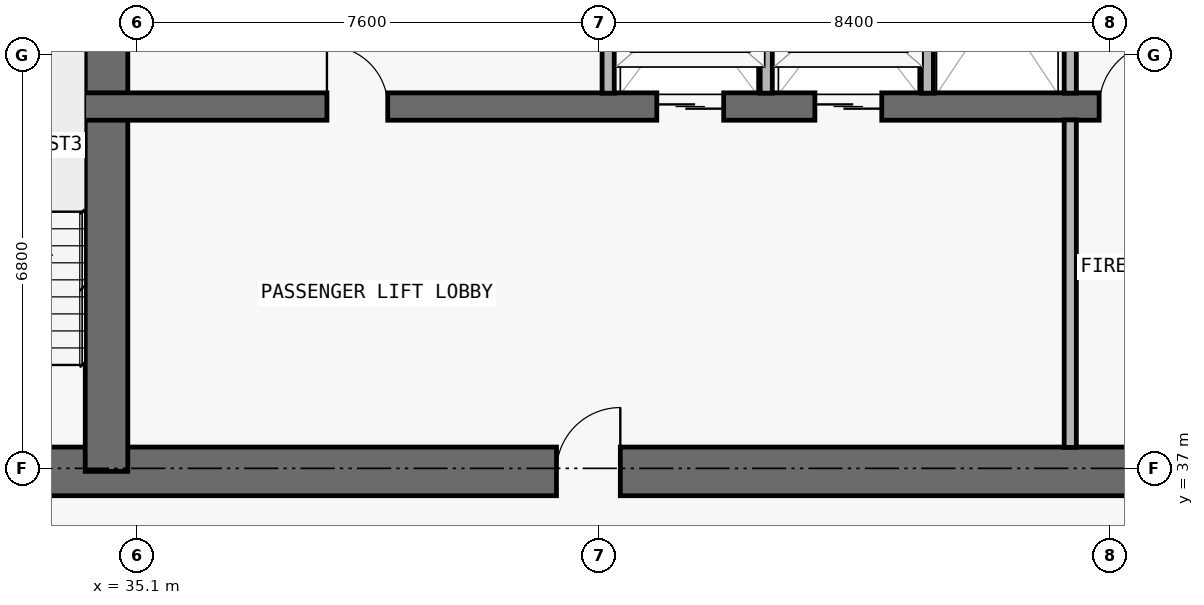
"""IFC4 building model, lengths in metres.
Left out: names, types, materials, properties, quantities, classifications, styles, units other than length and angle.
Written with IfcOpenShell. Run it as: python <this file> out.ifc"""

import sys

from ifc_helpers import new_model, si_unit, direction, frame, frame_2d, origin, place, context, subcontext, project, spatial, rectangle, extrude, element, fill, save


model = new_model("IFC4")
c1 = context("Model", 3, precision=1e-05, world=origin(), true_north=direction((0.0, 1.0)))
c2 = subcontext(c1, "Body", "Model", "MODEL_VIEW")
j1 = project(units=[si_unit("LENGTHUNIT", "METRE"), si_unit("PLANEANGLEUNIT", "RADIAN")], contexts=[c1])
p1 = place(None, origin())
s1 = spatial("IfcSite", under=j1, at=p1, CompositionType="ELEMENT")
p2 = place(p1, origin())
s2 = spatial("IfcBuilding", under=s1, at=p2, CompositionType="ELEMENT")
p3 = place(p2, frame((0.0, 0.0, 102.6)))
s3 = spatial("IfcBuildingStorey", under=s2, at=p3, CompositionType="ELEMENT", Elevation=102.6)
p4 = place(p3, frame((17.85, 36.95, 0.0), z_axis=(0.0, 0.0, 1.0), x_axis=(1.0, 0.0, 0.0)))
e1 = element("IfcWall", 1, at=p4, inside=s3, PredefinedType="SHEAR", context=c2, shape_type="SweptSolid", body=[
    extrude(rectangle(XDim=42.1, YDim=0.8, at=frame_2d((21.05, 0.0))), origin(), (0.0, 0.0, 1.0), 3.05),
])
p5 = place(p4, frame((14.45, 0.0, 0.0)))
e2 = element("IfcOpeningElement", 2, at=p5, cuts=e1, PredefinedType="OPENING", context=c2, shape_type="SweptSolid", body=[
    extrude(rectangle(XDim=1.1, YDim=2.15, at=frame_2d((0.55, 1.075))), frame((0.0, 0.41, 0.0), z_axis=(0.0, -1.0, 0.0), x_axis=(1.0, 0.0, 0.0)), (0.0, 0.0, 1.0), 0.82),
])
p6 = place(p4, frame((6.3, 0.0, 0.0)))
e3 = element("IfcOpeningElement", 3, at=p6, cuts=e1, PredefinedType="OPENING", context=c2, shape_type="SweptSolid", body=[
    extrude(rectangle(XDim=1.05, YDim=2.15, at=frame_2d((0.525, 1.075))), frame((0.0, 0.41, 0.0), z_axis=(0.0, -1.0, 0.0), x_axis=(1.0, 0.0, 0.0)), (0.0, 0.0, 1.0), 0.82),
])
p7 = place(p4, frame((34.8, 0.0, 0.0)))
e4 = element("IfcOpeningElement", 4, at=p7, cuts=e1, PredefinedType="OPENING", context=c2, shape_type="SweptSolid", body=[
    extrude(rectangle(XDim=1.05, YDim=2.15, at=frame_2d((0.525, 1.075))), frame((0.0, 0.41, 0.0), z_axis=(0.0, -1.0, 0.0), x_axis=(1.0, 0.0, 0.0)), (0.0, 0.0, 1.0), 0.82),
])
p8 = place(p4, frame((10.913, 0.0, 0.0)))
e5 = element("IfcOpeningElement", 5, at=p8, cuts=e1, PredefinedType="OPENING", context=c2, shape_type="SweptSolid", body=[
    extrude(rectangle(XDim=1.05, YDim=2.15, at=frame_2d((0.525, 1.075))), frame((0.0, 0.41, 0.0), z_axis=(0.0, -1.0, 0.0), x_axis=(1.0, 0.0, 0.0)), (0.0, 0.0, 1.0), 0.82),
])
p9 = place(p4, frame((24.15, 0.0, 0.0)))
e6 = element("IfcOpeningElement", 6, at=p9, cuts=e1, PredefinedType="OPENING", context=c2, shape_type="SweptSolid", body=[
    extrude(rectangle(XDim=1.05, YDim=2.15, at=frame_2d((0.525, 1.075))), frame((0.0, 0.41, 0.0), z_axis=(0.0, -1.0, 0.0), x_axis=(1.0, 0.0, 0.0)), (0.0, 0.0, 1.0), 0.82),
])
p10 = place(p3, frame((34.6, 36.95, 0.0), z_axis=(0.0, 0.0, 1.0), x_axis=(0.0, 1.0, 0.0)))
e7 = element("IfcWall", 7, at=p10, inside=s3, PredefinedType="SHEAR", context=c2, shape_type="SweptSolid", body=[
    extrude(rectangle(XDim=9.625, YDim=0.7, at=frame_2d((4.812, 0.0))), origin(), (0.0, 0.0, 1.0), 3.05),
])
p11 = place(p3, frame((22.25, 42.95, 0.0), z_axis=(0.0, 0.0, 1.0), x_axis=(1.0, 0.0, 0.0)))
e8 = element("IfcWall", 8, at=p11, inside=s3, PredefinedType="SHEAR", context=c2, shape_type="SweptSolid", body=[
    extrude(rectangle(XDim=33.3, YDim=0.45, at=frame_2d((16.65, 0.0))), origin(), (0.0, 0.0, 1.0), 3.05),
])
p12 = place(p11, frame((1.05, 0.0, 0.0)))
e9 = element("IfcOpeningElement", 9, at=p12, cuts=e8, PredefinedType="OPENING", context=c2, shape_type="SweptSolid", body=[
    extrude(rectangle(XDim=1.2, YDim=2.2, at=frame_2d((0.6, 1.1))), frame((0.0, 0.235, 0.0), z_axis=(0.0, -1.0, 0.0), x_axis=(1.0, 0.0, 0.0)), (0.0, 0.0, 1.0), 0.47),
])
p13 = place(p11, frame((31.05, 0.0, 0.0)))
e10 = element("IfcOpeningElement", 10, at=p13, cuts=e8, PredefinedType="OPENING", context=c2, shape_type="SweptSolid", body=[
    extrude(rectangle(XDim=1.2, YDim=2.2, at=frame_2d((0.6, 1.1))), frame((0.0, 0.235, 0.0), z_axis=(0.0, -1.0, 0.0), x_axis=(1.0, 0.0, 0.0)), (0.0, 0.0, 1.0), 0.47),
])
p14 = place(p11, frame((21.4, 0.0, 0.0)))
e11 = element("IfcOpeningElement", 11, at=p14, cuts=e8, PredefinedType="OPENING", context=c2, shape_type="SweptSolid", body=[
    extrude(rectangle(XDim=1.1, YDim=2.2, at=frame_2d((0.55, 1.1))), frame((0.0, 0.235, 0.0), z_axis=(0.0, -1.0, 0.0), x_axis=(1.0, 0.0, 0.0)), (0.0, 0.0, 1.0), 0.47),
])
p15 = place(p11, frame((24.0, 0.0, 0.0)))
e12 = element("IfcOpeningElement", 12, at=p15, cuts=e8, PredefinedType="OPENING", context=c2, shape_type="SweptSolid", body=[
    extrude(rectangle(XDim=1.1, YDim=2.2, at=frame_2d((0.55, 1.1))), frame((0.0, 0.235, 0.0), z_axis=(0.0, -1.0, 0.0), x_axis=(1.0, 0.0, 0.0)), (0.0, 0.0, 1.0), 0.47),
])
p16 = place(p11, frame((3.625, 0.0, 0.0)))
e13 = element("IfcOpeningElement", 13, at=p16, cuts=e8, PredefinedType="OPENING", context=c2, shape_type="SweptSolid", body=[
    extrude(rectangle(XDim=1.05, YDim=2.15, at=frame_2d((0.525, 1.075))), frame((0.0, 0.235, 0.0), z_axis=(0.0, -1.0, 0.0), x_axis=(1.0, 0.0, 0.0)), (0.0, 0.0, 1.0), 0.47),
])
p17 = place(p11, frame((28.675, 0.0, 0.0)))
e14 = element("IfcOpeningElement", 14, at=p17, cuts=e8, PredefinedType="OPENING", context=c2, shape_type="SweptSolid", body=[
    extrude(rectangle(XDim=1.05, YDim=2.15, at=frame_2d((0.525, 1.075))), frame((0.0, 0.235, 0.0), z_axis=(0.0, -1.0, 0.0), x_axis=(1.0, 0.0, 0.0)), (0.0, 0.0, 1.0), 0.47),
])
p18 = place(p11, frame((15.975, 0.0, 0.0)))
e15 = element("IfcOpeningElement", 15, at=p18, cuts=e8, PredefinedType="OPENING", context=c2, shape_type="SweptSolid", body=[
    extrude(rectangle(XDim=1.0, YDim=2.2, at=frame_2d((0.5, 1.1))), frame((0.0, 0.235, 0.0), z_axis=(0.0, -1.0, 0.0), x_axis=(1.0, 0.0, 0.0)), (0.0, 0.0, 1.0), 0.47),
])
for number, where, z_axis, x_axis in (
    (16, (42.85, 43.17, 0.0), (0.0, 0.0, 1.0), (0.0, 1.0, 0.0)),
    (17, (45.45, 43.17, 0.0), (0.0, 0.0, 1.0), (0.0, 1.0, 0.0)),
    (18, (48.1, 43.17, 0.0), (0.0, 0.0, 1.0), (0.0, 1.0, 0.0)),
):
    element("IfcWall", number, at=place(p3, frame(where, z_axis=z_axis, x_axis=x_axis)), inside=s3, PredefinedType="PARTITIONING", context=c2, shape_type="SweptSolid", body=[
        extrude(rectangle(XDim=3.185, YDim=0.2, at=frame_2d((1.593, 0.0))), origin(), (0.0, 0.0, 1.0), 3.05),
    ])
p19 = place(p3, frame((50.45, 37.345, 0.0), z_axis=(0.0, 0.0, 1.0), x_axis=(0.0, 1.0, 0.0)))
e19 = element("IfcWall", 19, at=p19, inside=s3, PredefinedType="PARTITIONING", context=c2, shape_type="SweptSolid", body=[
    extrude(rectangle(XDim=5.385, YDim=0.2, at=frame_2d((2.692, 0.0))), origin(), (0.0, 0.0, 1.0), 3.05),
])
p20 = place(p3, frame((50.45, 43.17, 0.0), z_axis=(0.0, 0.0, 1.0), x_axis=(0.0, 1.0, 0.0)))
e20 = element("IfcWall", 20, at=p20, inside=s3, PredefinedType="PARTITIONING", context=c2, shape_type="SweptSolid", body=[
    extrude(rectangle(XDim=3.185, YDim=0.2, at=frame_2d((1.593, 0.0))), origin(), (0.0, 0.0, 1.0), 3.05),
])
p21 = place(p14, origin())
e21 = element("IfcDoor", 21, at=p21, inside=s3, OperationType="DOUBLE_DOOR_SLIDING", PredefinedType="DOOR", context=c2, shape_type="SweptSolid", body=[
    extrude(rectangle(XDim=1.1, YDim=2.2, at=frame_2d((0.55, 1.1))), frame((0.0, 0.025, 0.0), z_axis=(0.0, -1.0, 0.0), x_axis=(1.0, 0.0, 0.0)), (0.0, 0.0, 1.0), 0.05),
])
fill(e11, e21)
p22 = place(p15, origin())
e22 = element("IfcDoor", 22, at=p22, inside=s3, OperationType="DOUBLE_DOOR_SLIDING", PredefinedType="DOOR", context=c2, shape_type="SweptSolid", body=[
    extrude(rectangle(XDim=1.1, YDim=2.2, at=frame_2d((0.55, 1.1))), frame((0.0, 0.025, 0.0), z_axis=(0.0, -1.0, 0.0), x_axis=(1.0, 0.0, 0.0)), (0.0, 0.0, 1.0), 0.05),
])
fill(e12, e22)
p23 = place(p17, origin())
e23 = element("IfcDoor", 23, at=p23, inside=s3, OperationType="SINGLE_SWING_RIGHT", PredefinedType="DOOR", context=c2, shape_type="SweptSolid", body=[
    extrude(rectangle(XDim=1.05, YDim=2.15, at=frame_2d((0.525, 1.075))), frame((0.0, 0.025, 0.0), z_axis=(0.0, -1.0, 0.0), x_axis=(1.0, 0.0, 0.0)), (0.0, 0.0, 1.0), 0.05),
])
fill(e14, e23)
p24 = place(p9, origin())
e24 = element("IfcDoor", 24, at=p24, inside=s3, OperationType="SINGLE_SWING_RIGHT", PredefinedType="DOOR", context=c2, shape_type="SweptSolid", body=[
    extrude(rectangle(XDim=1.05, YDim=2.15, at=frame_2d((0.525, 1.075))), frame((0.0, 0.025, 0.0), z_axis=(0.0, -1.0, 0.0), x_axis=(1.0, 0.0, 0.0)), (0.0, 0.0, 1.0), 0.05),
])
fill(e6, e24)
p25 = place(p18, origin())
e25 = element("IfcDoor", 25, at=p25, inside=s3, OperationType="SINGLE_SWING_LEFT", PredefinedType="DOOR", context=c2, shape_type="SweptSolid", body=[
    extrude(rectangle(XDim=1.0, YDim=2.2, at=frame_2d((0.5, 1.1))), frame((0.0, 0.025, 0.0), z_axis=(0.0, -1.0, 0.0), x_axis=(1.0, 0.0, 0.0)), (0.0, 0.0, 1.0), 0.05),
])
fill(e15, e25)
save(model, sys.argv[1])
